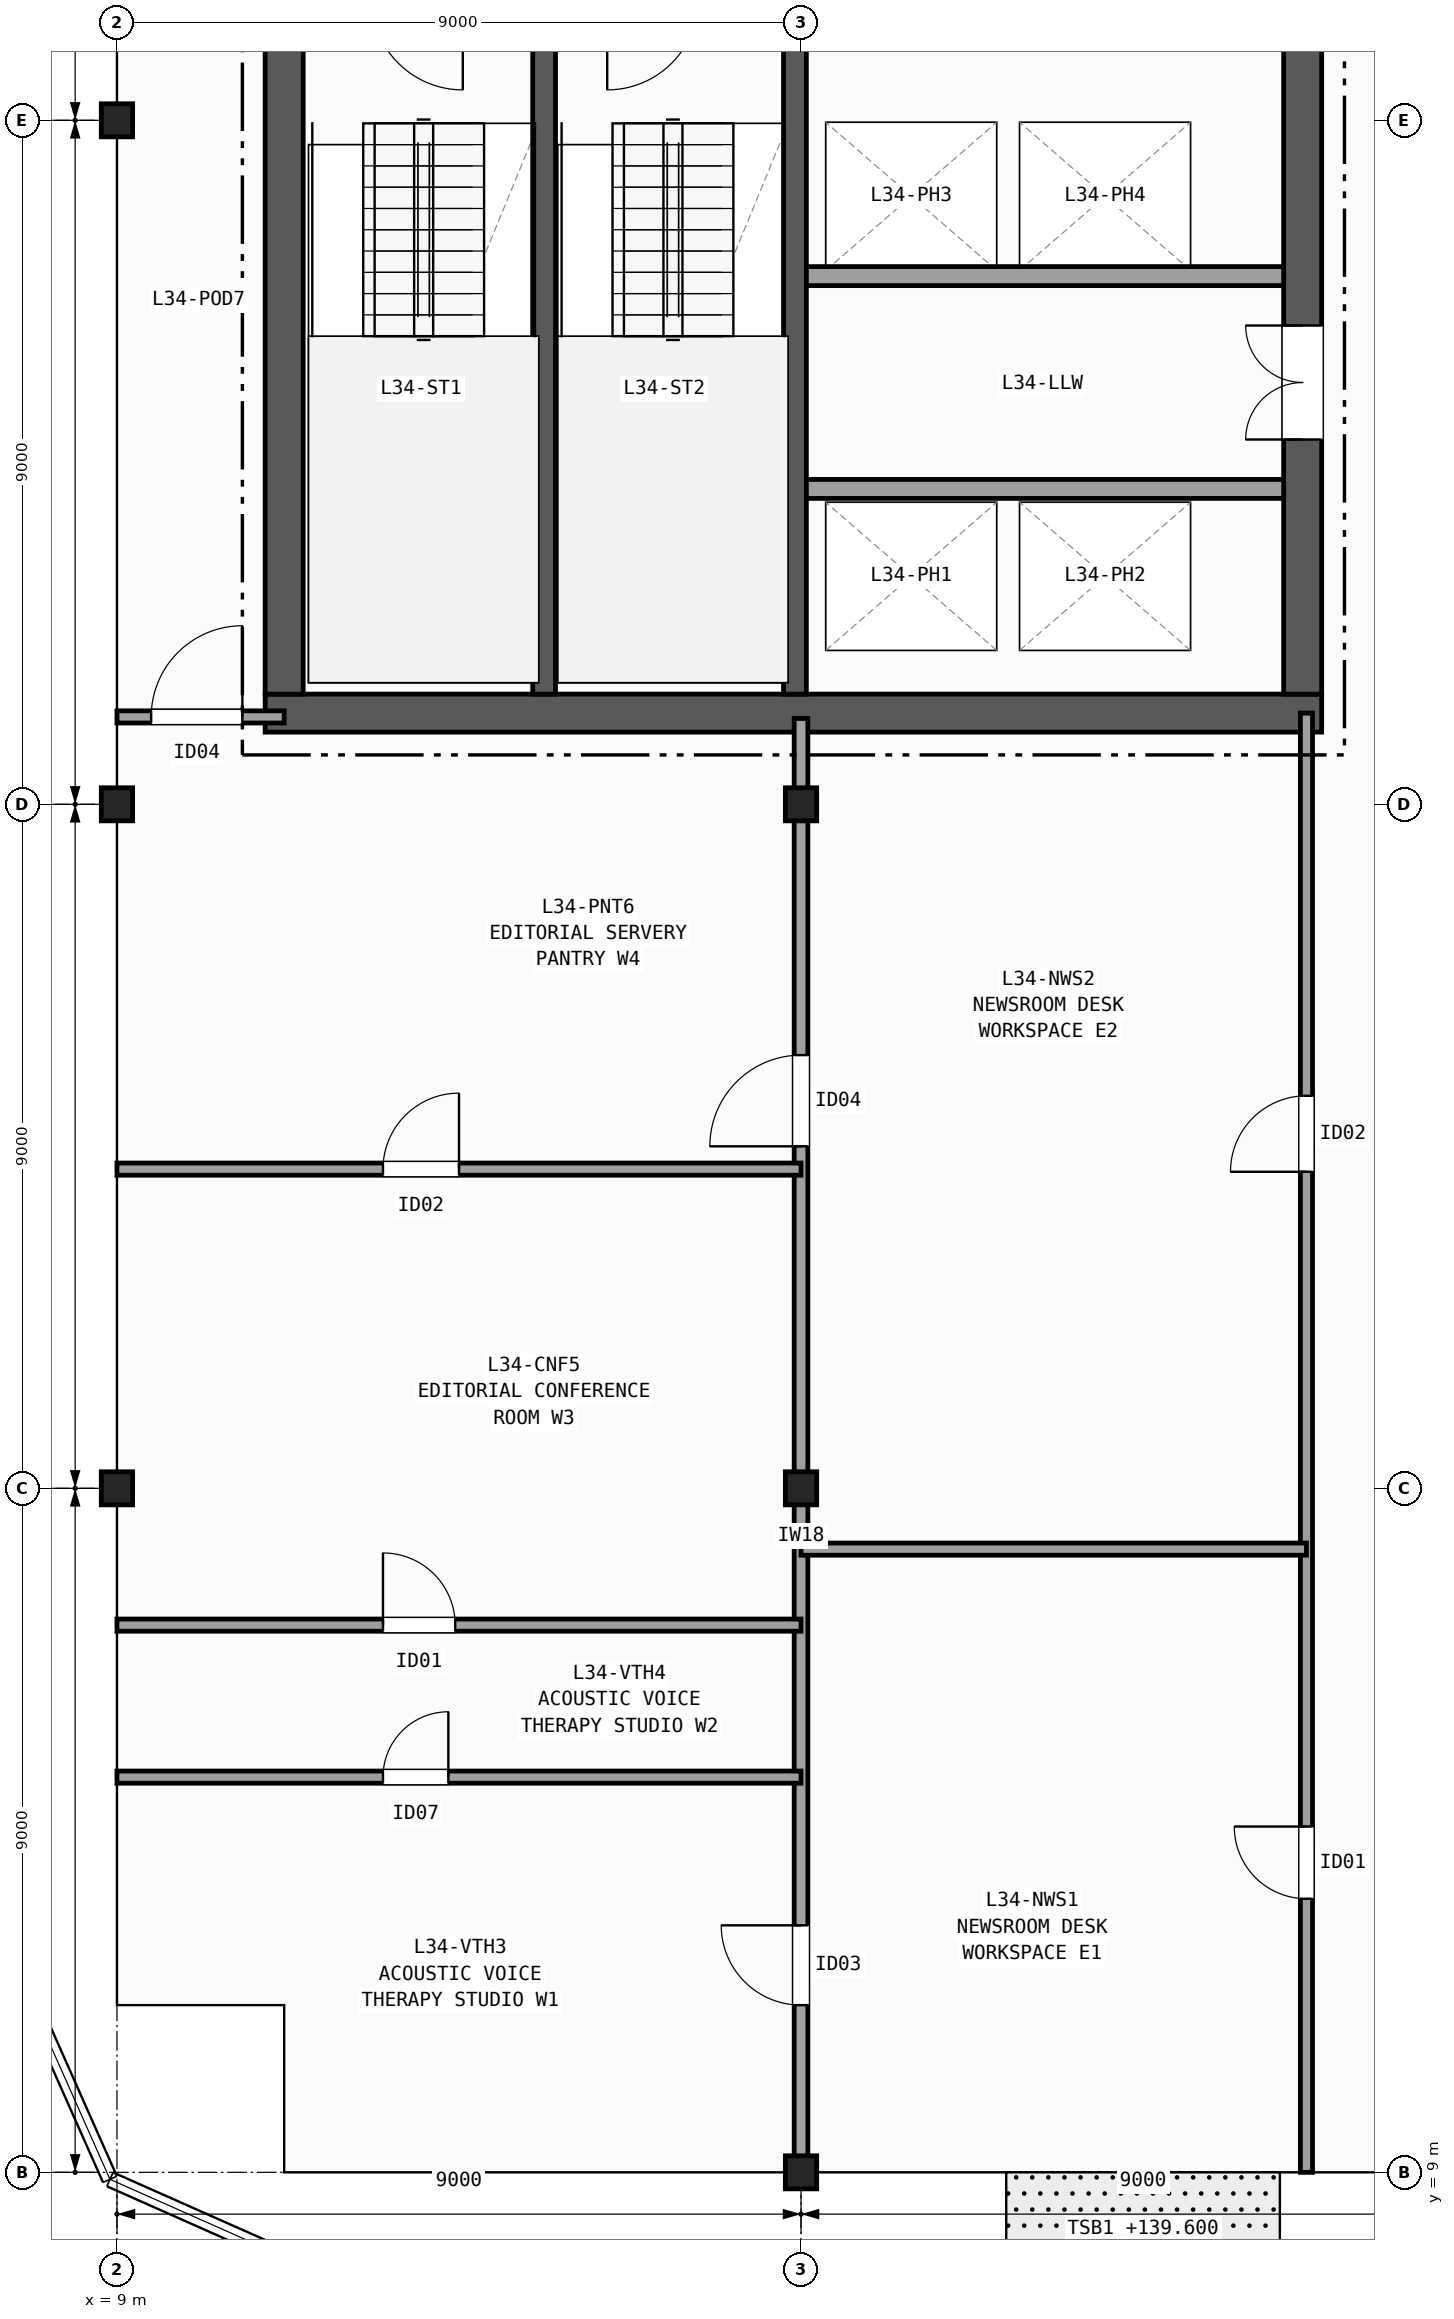
"""IFC4 building model, lengths in metres.
Left out: names, types, materials, properties, quantities, classifications, styles, units other than length and angle.
Written with IfcOpenShell. Run it as: python <this file> out.ifc"""

import sys

from ifc_helpers import new_model, si_unit, direction, frame, frame_2d, origin, origin_2d, place, context, subcontext, project, spatial, rectangle, i_section, extrude, element, fill, save


model = new_model("IFC4")
c1 = context("Model", 3, precision=1e-05, world=origin(), true_north=direction((0.0, 1.0)))
c2 = subcontext(c1, "Body", "Model", "MODEL_VIEW")
j1 = project(units=[si_unit("LENGTHUNIT", "METRE"), si_unit("PLANEANGLEUNIT", "RADIAN")], contexts=[c1])
p1 = place(None, origin())
s1 = spatial("IfcSite", under=j1, at=p1, CompositionType="ELEMENT")
p2 = place(p1, origin())
s2 = spatial("IfcBuilding", under=s1, at=p2, CompositionType="ELEMENT")
p3 = place(p2, frame((0.0, 0.0, 139.6)))
s3 = spatial("IfcBuildingStorey", under=s2, at=p3, CompositionType="ELEMENT", Elevation=139.6)
for number, where, z_axis, x_axis in (
    (1, (9.0, 18.0, 0.0), (0.0, 0.0, 1.0), (1.0, 0.0, 0.0)),
    (2, (9.0, 27.0, 0.0), (0.0, 0.0, 1.0), (1.0, 0.0, 0.0)),
    (3, (9.0, 36.0, 0.0), (0.0, 0.0, 1.0), (1.0, 0.0, 0.0)),
    (4, (18.0, 9.0, 0.0), (0.0, 0.0, 1.0), (1.0, 0.0, 0.0)),
    (5, (18.0, 18.0, 0.0), (0.0, 0.0, 1.0), (1.0, 0.0, 0.0)),
    (6, (18.0, 27.0, 0.0), (0.0, 0.0, 1.0), (1.0, 0.0, 0.0)),
):
    element("IfcColumn", number, at=place(p3, frame(where, z_axis=z_axis, x_axis=x_axis)), inside=s3, PredefinedType="COLUMN", context=c2, shape_type="SweptSolid", body=[
        extrude(i_section(OverallWidth=0.412, OverallDepth=0.435, WebThickness=0.036, FlangeThickness=0.057, FilletRadius=0.015, at=origin_2d()), origin(), (0.0, 0.0, 1.0), 3.7),
    ])
p4 = place(p3, frame((10.95, 28.2, 0.0), z_axis=(0.0, 0.0, 1.0), x_axis=(1.0, 0.0, 0.0)))
e7 = element("IfcWall", 7, at=p4, inside=s3, PredefinedType="SHEAR", context=c2, shape_type="SweptSolid", body=[
    extrude(rectangle(XDim=13.9, YDim=0.5, at=frame_2d((6.95, 0.0))), origin(), (0.0, 0.0, 1.0), 3.42),
])
p5 = place(p3, frame((11.2, 42.15, 0.0), z_axis=(0.0, 0.0, 1.0), x_axis=(0.0, -1.0, 0.0)))
e8 = element("IfcWall", 8, at=p5, inside=s3, PredefinedType="SHEAR", context=c2, shape_type="SweptSolid", body=[
    extrude(rectangle(XDim=13.7, YDim=0.5, at=frame_2d((6.85, 0.0))), origin(), (0.0, 0.0, 1.0), 3.42),
])
p6 = place(p3, frame((24.6, 28.45, 0.0), z_axis=(0.0, 0.0, 1.0), x_axis=(0.0, 1.0, 0.0)))
e9 = element("IfcWall", 9, at=p6, inside=s3, PredefinedType="SHEAR", context=c2, shape_type="SweptSolid", body=[
    extrude(rectangle(XDim=13.7, YDim=0.5, at=frame_2d((6.85, 0.0))), origin(), (0.0, 0.0, 1.0), 3.42),
])
p7 = place(p6, frame((3.35, 0.0, 0.0)))
e10 = element("IfcOpeningElement", 10, at=p7, cuts=e9, PredefinedType="OPENING", context=c2, shape_type="SweptSolid", body=[
    extrude(rectangle(XDim=1.5, YDim=2.2, at=frame_2d((0.75, 1.1))), frame((0.0, 0.26, 0.0), z_axis=(0.0, -1.0, 0.0), x_axis=(1.0, 0.0, 0.0)), (0.0, 0.0, 1.0), 0.52),
])
p8 = place(p6, frame((9.95, 0.0, 0.0)))
e11 = element("IfcOpeningElement", 11, at=p8, cuts=e9, PredefinedType="OPENING", context=c2, shape_type="SweptSolid", body=[
    extrude(rectangle(XDim=0.9, YDim=2.1, at=frame_2d((0.45, 1.05))), frame((0.0, 0.26, 0.0), z_axis=(0.0, -1.0, 0.0), x_axis=(1.0, 0.0, 0.0)), (0.0, 0.0, 1.0), 0.52),
])
p9 = place(p6, frame((12.05, 0.0, 0.0)))
e12 = element("IfcOpeningElement", 12, at=p9, cuts=e9, PredefinedType="OPENING", context=c2, shape_type="SweptSolid", body=[
    extrude(rectangle(XDim=0.9, YDim=2.1, at=frame_2d((0.45, 1.05))), frame((0.0, 0.26, 0.0), z_axis=(0.0, -1.0, 0.0), x_axis=(1.0, 0.0, 0.0)), (0.0, 0.0, 1.0), 0.52),
])
p10 = place(p3, frame((14.62, 28.45, 0.0), z_axis=(0.0, 0.0, 1.0), x_axis=(0.0, 1.0, 0.0)))
e13 = element("IfcWall", 13, at=p10, inside=s3, PredefinedType="SHEAR", context=c2, shape_type="SweptSolid", body=[
    extrude(rectangle(XDim=9.0, YDim=0.3, at=frame_2d((4.5, 0.0))), origin(), (0.0, 0.0, 1.0), 3.42),
])
p11 = place(p3, frame((17.92, 42.15, 0.0), z_axis=(0.0, 0.0, 1.0), x_axis=(0.0, -1.0, 0.0)))
e14 = element("IfcWall", 14, at=p11, inside=s3, PredefinedType="SHEAR", context=c2, shape_type="SweptSolid", body=[
    extrude(rectangle(XDim=13.7, YDim=0.3, at=frame_2d((6.85, 0.0))), origin(), (0.0, 0.0, 1.0), 3.42),
])
p12 = place(p11, frame((1.975, 0.0, 0.0)))
e15 = element("IfcOpeningElement", 15, at=p12, cuts=e14, PredefinedType="OPENING", context=c2, shape_type="SweptSolid", body=[
    extrude(rectangle(XDim=1.15, YDim=2.15, at=frame_2d((0.575, 1.075))), frame((0.0, 0.16, 0.0), z_axis=(0.0, -1.0, 0.0), x_axis=(1.0, 0.0, 0.0)), (0.0, 0.0, 1.0), 0.32),
])
for number, where, z_axis, x_axis in (
    (16, (18.07, 31.15, 0.0), (0.0, 0.0, 1.0), (1.0, 0.0, 0.0)),
    (17, (24.35, 33.95, 0.0), (0.0, 0.0, 1.0), (-1.0, 0.0, 0.0)),
):
    element("IfcWall", number, at=place(p3, frame(where, z_axis=z_axis, x_axis=x_axis)), inside=s3, PredefinedType="PARTITIONING", context=c2, shape_type="SweptSolid", body=[
        extrude(rectangle(XDim=6.28, YDim=0.25, at=frame_2d((3.14, 0.0))), origin(), (0.0, 0.0, 1.0), 3.42),
    ])
p13 = place(p3, frame((9.0, 28.15, 0.0), z_axis=(0.0, 0.0, 1.0), x_axis=(1.0, 0.0, 0.0)))
e18 = element("IfcWall", 18, at=p13, inside=s3, PredefinedType="PARTITIONING", context=c2, shape_type="SweptSolid", body=[
    extrude(rectangle(XDim=2.2, YDim=0.16, at=frame_2d((1.1, 0.0))), origin(), (0.0, 0.0, 1.0), 2.634),
])
p14 = place(p13, frame((0.45, 0.0, 0.0)))
e19 = element("IfcOpeningElement", 19, at=p14, cuts=e18, PredefinedType="OPENING", context=c2, shape_type="SweptSolid", body=[
    extrude(rectangle(XDim=1.2, YDim=2.15, at=frame_2d((0.6, 1.075))), frame((0.0, 0.09, 0.0), z_axis=(0.0, -1.0, 0.0), x_axis=(1.0, 0.0, 0.0)), (0.0, 0.0, 1.0), 0.18),
])
p15 = place(p3, frame((24.65, 9.0, 0.0), z_axis=(0.0, 0.0, 1.0), x_axis=(0.0, 1.0, 0.0)))
e20 = element("IfcWall", 20, at=p15, inside=s3, PredefinedType="PARTITIONING", context=c2, shape_type="SweptSolid", body=[
    extrude(rectangle(XDim=19.2, YDim=0.16, at=frame_2d((9.6, 0.0))), origin(), (0.0, 0.0, 1.0), 2.634),
])
p16 = place(p15, frame((3.6, 0.0, 0.0)))
e21 = element("IfcOpeningElement", 21, at=p16, cuts=e20, PredefinedType="OPENING", context=c2, shape_type="SweptSolid", body=[
    extrude(rectangle(XDim=0.95, YDim=2.1, at=frame_2d((0.475, 1.05))), frame((0.0, 0.09, 0.0), z_axis=(0.0, -1.0, 0.0), x_axis=(1.0, 0.0, 0.0)), (0.0, 0.0, 1.0), 0.18),
])
p17 = place(p15, frame((13.165, 0.0, 0.0)))
e22 = element("IfcOpeningElement", 22, at=p17, cuts=e20, PredefinedType="OPENING", context=c2, shape_type="SweptSolid", body=[
    extrude(rectangle(XDim=1.0, YDim=2.1, at=frame_2d((0.5, 1.05))), frame((0.0, 0.09, 0.0), z_axis=(0.0, -1.0, 0.0), x_axis=(1.0, 0.0, 0.0)), (0.0, 0.0, 1.0), 0.18),
])
p18 = place(p3, frame((18.0, 9.0, 0.0), z_axis=(0.0, 0.0, 1.0), x_axis=(0.0, 1.0, 0.0)))
e23 = element("IfcWall", 23, at=p18, inside=s3, PredefinedType="PARTITIONING", context=c2, shape_type="SweptSolid", body=[
    extrude(rectangle(XDim=19.13, YDim=0.18, at=frame_2d((9.565, 0.0))), origin(), (0.0, 0.0, 1.0), 2.634),
])
p19 = place(p18, frame((2.2, 0.0, 0.0)))
e24 = element("IfcOpeningElement", 24, at=p19, cuts=e23, PredefinedType="OPENING", context=c2, shape_type="SweptSolid", body=[
    extrude(rectangle(XDim=1.05, YDim=2.15, at=frame_2d((0.525, 1.075))), frame((0.0, 0.1, 0.0), z_axis=(0.0, -1.0, 0.0), x_axis=(1.0, 0.0, 0.0)), (0.0, 0.0, 1.0), 0.2),
])
p20 = place(p18, frame((13.5, 0.0, 0.0)))
e25 = element("IfcOpeningElement", 25, at=p20, cuts=e23, PredefinedType="OPENING", context=c2, shape_type="SweptSolid", body=[
    extrude(rectangle(XDim=1.2, YDim=2.15, at=frame_2d((0.6, 1.075))), frame((0.0, 0.1, 0.0), z_axis=(0.0, -1.0, 0.0), x_axis=(1.0, 0.0, 0.0)), (0.0, 0.0, 1.0), 0.2),
])
p21 = place(p3, frame((18.0, 17.2, 0.0), z_axis=(0.0, 0.0, 1.0), x_axis=(1.0, 0.0, 0.0)))
e26 = element("IfcWall", 26, at=p21, inside=s3, PredefinedType="PARTITIONING", context=c2, shape_type="SweptSolid", body=[
    extrude(rectangle(XDim=6.65, YDim=0.16, at=frame_2d((3.325, 0.0))), origin(), (0.0, 0.0, 1.0), 2.792),
])
p22 = place(p3, frame((9.0, 14.2, 0.0), z_axis=(0.0, 0.0, 1.0), x_axis=(1.0, 0.0, 0.0)))
e27 = element("IfcWall", 27, at=p22, inside=s3, PredefinedType="PARTITIONING", context=c2, shape_type="SweptSolid", body=[
    extrude(rectangle(XDim=9.0, YDim=0.16, at=frame_2d((4.5, 0.0))), origin(), (0.0, 0.0, 1.0), 2.792),
])
p23 = place(p22, frame((3.5, 0.0, 0.0)))
e28 = element("IfcOpeningElement", 28, at=p23, cuts=e27, PredefinedType="OPENING", context=c2, shape_type="SweptSolid", body=[
    extrude(rectangle(XDim=0.86, YDim=2.05, at=frame_2d((0.43, 1.025))), frame((0.0, 0.09, 0.0), z_axis=(0.0, -1.0, 0.0), x_axis=(1.0, 0.0, 0.0)), (0.0, 0.0, 1.0), 0.18),
])
p24 = place(p3, frame((9.0, 16.2, 0.0), z_axis=(0.0, 0.0, 1.0), x_axis=(1.0, 0.0, 0.0)))
e29 = element("IfcWall", 29, at=p24, inside=s3, PredefinedType="PARTITIONING", context=c2, shape_type="SweptSolid", body=[
    extrude(rectangle(XDim=9.0, YDim=0.16, at=frame_2d((4.5, 0.0))), origin(), (0.0, 0.0, 1.0), 2.792),
])
p25 = place(p24, frame((3.5, 0.0, 0.0)))
e30 = element("IfcOpeningElement", 30, at=p25, cuts=e29, PredefinedType="OPENING", context=c2, shape_type="SweptSolid", body=[
    extrude(rectangle(XDim=0.95, YDim=2.1, at=frame_2d((0.475, 1.05))), frame((0.0, 0.09, 0.0), z_axis=(0.0, -1.0, 0.0), x_axis=(1.0, 0.0, 0.0)), (0.0, 0.0, 1.0), 0.18),
])
p26 = place(p3, frame((9.0, 22.2, 0.0), z_axis=(0.0, 0.0, 1.0), x_axis=(1.0, 0.0, 0.0)))
e31 = element("IfcWall", 31, at=p26, inside=s3, PredefinedType="PARTITIONING", context=c2, shape_type="SweptSolid", body=[
    extrude(rectangle(XDim=9.0, YDim=0.16, at=frame_2d((4.5, 0.0))), origin(), (0.0, 0.0, 1.0), 2.634),
])
p27 = place(p26, frame((3.5, 0.0, 0.0)))
e32 = element("IfcOpeningElement", 32, at=p27, cuts=e31, PredefinedType="OPENING", context=c2, shape_type="SweptSolid", body=[
    extrude(rectangle(XDim=1.0, YDim=2.1, at=frame_2d((0.5, 1.05))), frame((0.0, 0.09, 0.0), z_axis=(0.0, -1.0, 0.0), x_axis=(1.0, 0.0, 0.0)), (0.0, 0.0, 1.0), 0.18),
])
p28 = place(p7, origin())
e33 = element("IfcDoor", 33, at=p28, inside=s3, OperationType="DOUBLE_DOOR_SINGLE_SWING", PredefinedType="DOOR", context=c2, shape_type="SweptSolid", body=[
    extrude(rectangle(XDim=1.5, YDim=2.2, at=frame_2d((0.75, 1.1))), frame((0.0, 0.025, 0.0), z_axis=(0.0, -1.0, 0.0), x_axis=(1.0, 0.0, 0.0)), (0.0, 0.0, 1.0), 0.05),
])
fill(e10, e33)
p29 = place(p14, origin())
e34 = element("IfcDoor", 34, at=p29, inside=s3, OperationType="SINGLE_SWING_RIGHT", PredefinedType="DOOR", context=c2, shape_type="SweptSolid", body=[
    extrude(rectangle(XDim=1.2, YDim=2.15, at=frame_2d((0.6, 1.075))), frame((0.0, 0.025, 0.0), z_axis=(0.0, -1.0, 0.0), x_axis=(1.0, 0.0, 0.0)), (0.0, 0.0, 1.0), 0.05),
])
fill(e19, e34)
p30 = place(p16, origin())
e35 = element("IfcDoor", 35, at=p30, inside=s3, OperationType="SINGLE_SWING_RIGHT", PredefinedType="DOOR", context=c2, shape_type="SweptSolid", body=[
    extrude(rectangle(XDim=0.95, YDim=2.1, at=frame_2d((0.475, 1.05))), frame((0.0, 0.025, 0.0), z_axis=(0.0, -1.0, 0.0), x_axis=(1.0, 0.0, 0.0)), (0.0, 0.0, 1.0), 0.05),
])
fill(e21, e35)
p31 = place(p17, origin())
e36 = element("IfcDoor", 36, at=p31, inside=s3, OperationType="SINGLE_SWING_LEFT", PredefinedType="DOOR", context=c2, shape_type="SweptSolid", body=[
    extrude(rectangle(XDim=1.0, YDim=2.1, at=frame_2d((0.5, 1.05))), frame((0.0, 0.025, 0.0), z_axis=(0.0, -1.0, 0.0), x_axis=(1.0, 0.0, 0.0)), (0.0, 0.0, 1.0), 0.05),
])
fill(e22, e36)
p32 = place(p19, origin())
e37 = element("IfcDoor", 37, at=p32, inside=s3, OperationType="SINGLE_SWING_RIGHT", PredefinedType="DOOR", context=c2, shape_type="SweptSolid", body=[
    extrude(rectangle(XDim=1.05, YDim=2.15, at=frame_2d((0.525, 1.075))), frame((0.0, 0.025, 0.0), z_axis=(0.0, -1.0, 0.0), x_axis=(1.0, 0.0, 0.0)), (0.0, 0.0, 1.0), 0.05),
])
fill(e24, e37)
p33 = place(p20, origin())
e38 = element("IfcDoor", 38, at=p33, inside=s3, OperationType="SINGLE_SWING_LEFT", PredefinedType="DOOR", context=c2, shape_type="SweptSolid", body=[
    extrude(rectangle(XDim=1.2, YDim=2.15, at=frame_2d((0.6, 1.075))), frame((0.0, 0.025, 0.0), z_axis=(0.0, -1.0, 0.0), x_axis=(1.0, 0.0, 0.0)), (0.0, 0.0, 1.0), 0.05),
])
fill(e25, e38)
p34 = place(p23, origin())
e39 = element("IfcDoor", 39, at=p34, inside=s3, OperationType="SINGLE_SWING_RIGHT", PredefinedType="DOOR", context=c2, shape_type="SweptSolid", body=[
    extrude(rectangle(XDim=0.86, YDim=2.05, at=frame_2d((0.43, 1.025))), frame((0.0, 0.025, 0.0), z_axis=(0.0, -1.0, 0.0), x_axis=(1.0, 0.0, 0.0)), (0.0, 0.0, 1.0), 0.05),
])
fill(e28, e39)
p35 = place(p25, origin())
e40 = element("IfcDoor", 40, at=p35, inside=s3, OperationType="SINGLE_SWING_LEFT", PredefinedType="DOOR", context=c2, shape_type="SweptSolid", body=[
    extrude(rectangle(XDim=0.95, YDim=2.1, at=frame_2d((0.475, 1.05))), frame((0.0, 0.025, 0.0), z_axis=(0.0, -1.0, 0.0), x_axis=(1.0, 0.0, 0.0)), (0.0, 0.0, 1.0), 0.05),
])
fill(e30, e40)
p36 = place(p27, origin())
e41 = element("IfcDoor", 41, at=p36, inside=s3, OperationType="SINGLE_SWING_RIGHT", PredefinedType="DOOR", context=c2, shape_type="SweptSolid", body=[
    extrude(rectangle(XDim=1.0, YDim=2.1, at=frame_2d((0.5, 1.05))), frame((0.0, 0.025, 0.0), z_axis=(0.0, -1.0, 0.0), x_axis=(1.0, 0.0, 0.0)), (0.0, 0.0, 1.0), 0.05),
])
fill(e32, e41)
save(model, sys.argv[1])
